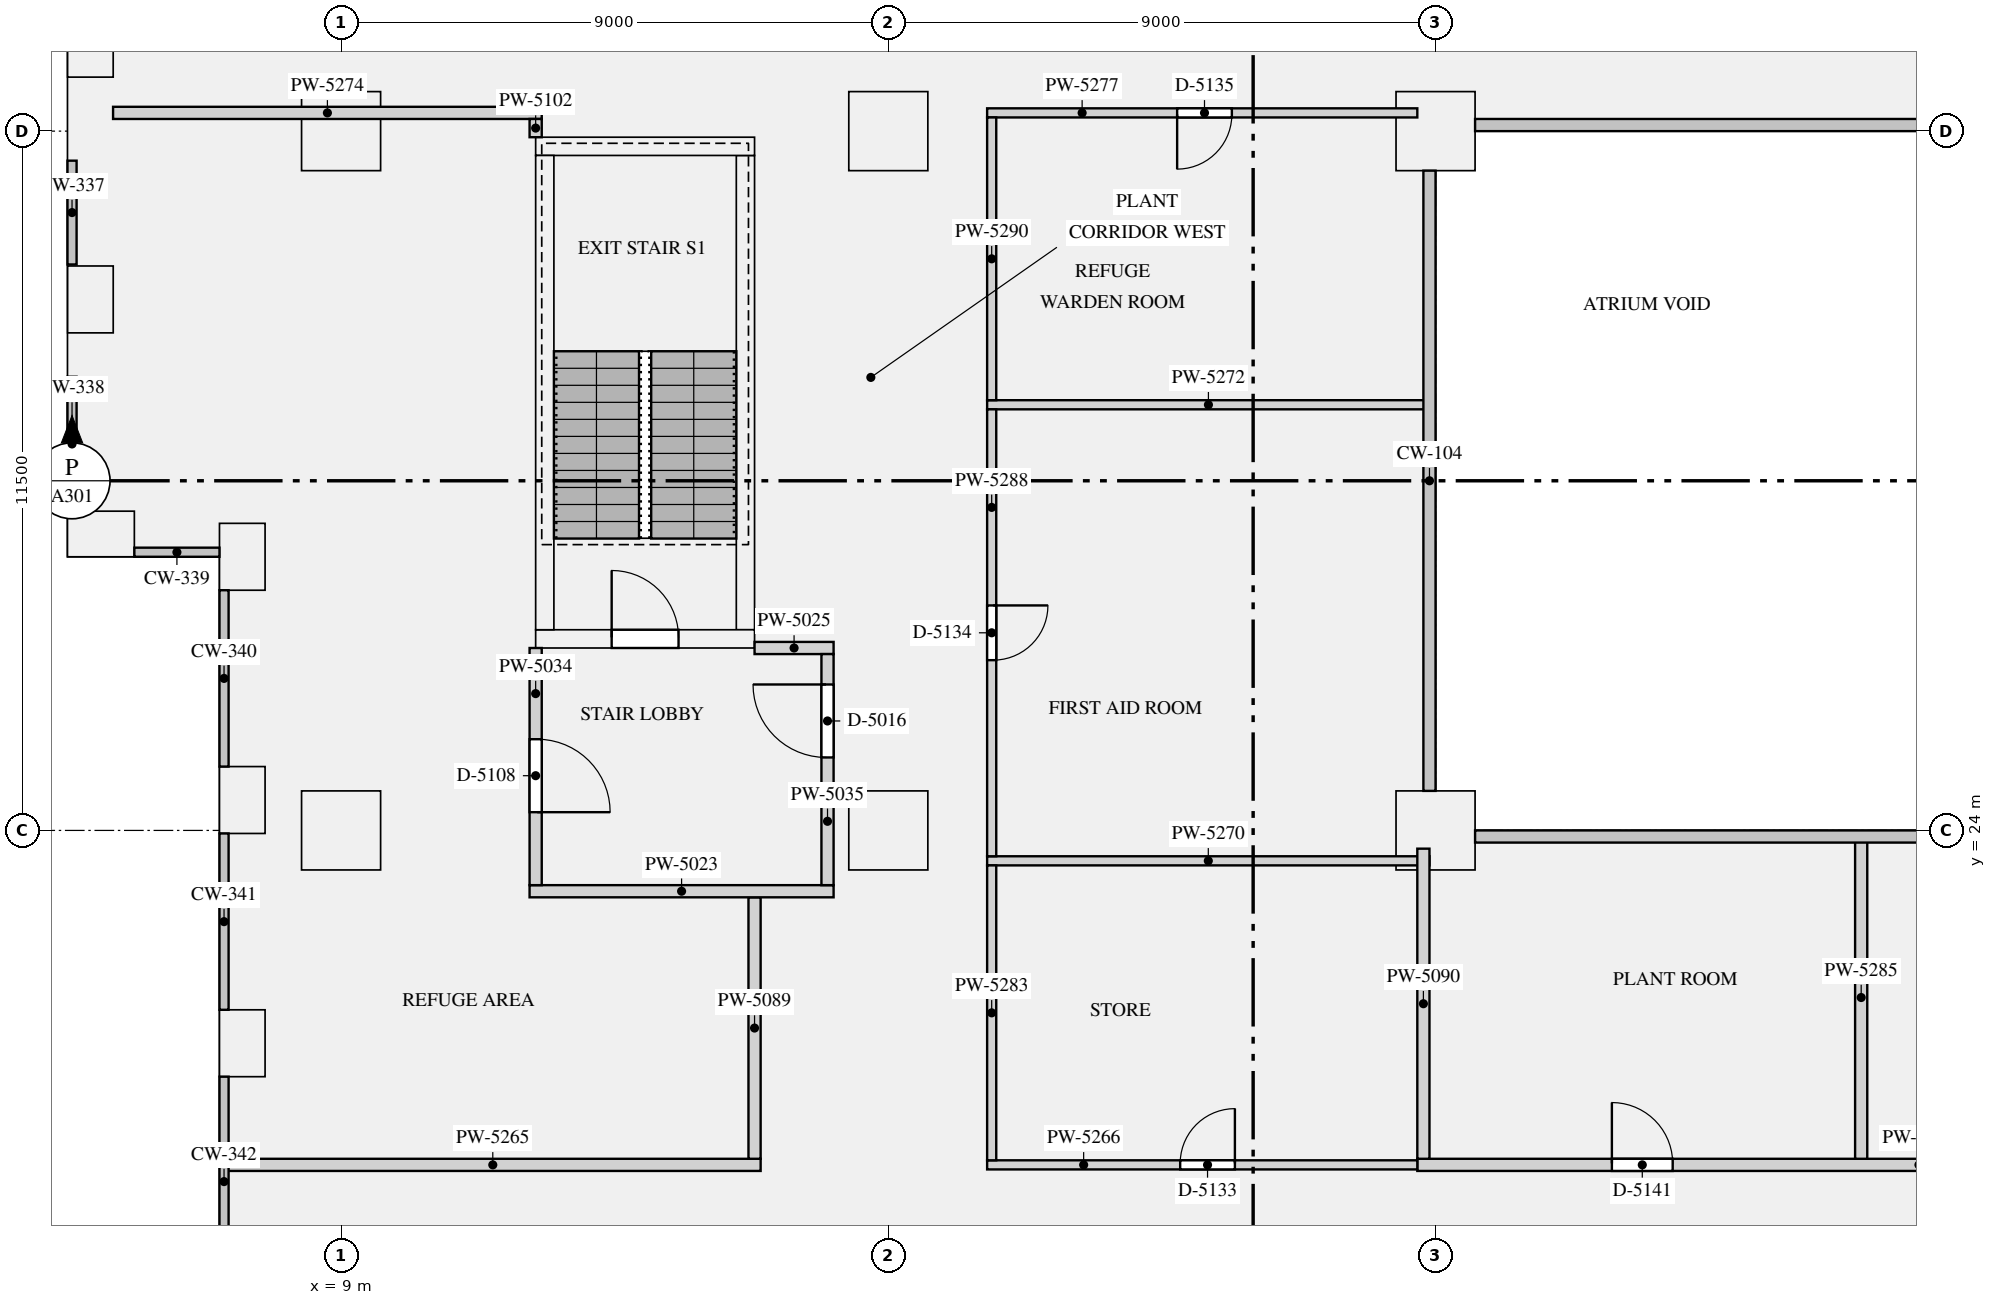
"""IFC4 building model, lengths in metres.
Left out: names, types, materials, properties, quantities, classifications, styles, units other than length and angle.
Written with IfcOpenShell. Run it as: python <this file> out.ifc"""

import sys

from ifc_helpers import new_model, si_unit, direction, frame, frame_2d, origin, origin_2d, place, context, subcontext, project, spatial, rectangle, extrude, element, fill, save


model = new_model("IFC4")
c1 = context("Model", 3, precision=1e-05, world=origin(), true_north=direction((0.0, 1.0)))
c2 = subcontext(c1, "Body", "Model", "MODEL_VIEW")
j1 = project(units=[si_unit("LENGTHUNIT", "METRE"), si_unit("PLANEANGLEUNIT", "RADIAN")], contexts=[c1])
p1 = place(None, origin())
s1 = spatial("IfcSite", under=j1, at=p1, CompositionType="ELEMENT")
p2 = place(p1, origin())
s2 = spatial("IfcBuilding", under=s1, at=p2, CompositionType="ELEMENT")
p3 = place(p2, frame((0.0, 0.0, 137.1)))
s3 = spatial("IfcBuildingStorey", under=s2, at=p3, CompositionType="ELEMENT", Elevation=137.1)
for number, where, z_axis, x_axis in (
    (1, (5.05, 28.875, 0.0), (0.0, 0.0, 1.0), (1.0, 0.0, 0.0)),
    (2, (7.375, 28.5, 0.0), (0.0, 0.0, 1.0), (0.0, -1.0, 0.0)),
    (3, (7.375, 24.5, 0.0), (0.0, 0.0, 1.0), (0.0, -1.0, 0.0)),
    (4, (7.375, 20.5, 0.0), (0.0, 0.0, 1.0), (0.0, -1.0, 0.0)),
):
    element("IfcColumn", number, at=place(p3, frame(where, z_axis=z_axis, x_axis=x_axis)), inside=s3, PredefinedType="USERDEFINED", context=c2, shape_type="SweptSolid", body=[
        extrude(rectangle(XDim=1.1, YDim=0.75, at=origin_2d()), origin(), (0.0, 0.0, 1.0), 4.2),
    ])
p4 = place(p3, frame((4.877, 36.938, -0.332), z_axis=(-0.005653102559, -0.302494318052, 0.953134423876), x_axis=(0.017809346029, 0.952968025262, 0.30254713686)))
e5 = element("IfcColumn", 5, at=p4, inside=s3, PredefinedType="USERDEFINED", context=c2, shape_type="SweptSolid", body=[
    extrude(rectangle(XDim=1.1, YDim=0.75, at=origin_2d()), origin(), (0.0, 0.0, 1.0), 4.578),
])
p5 = place(p3, frame((4.877, 32.732, -0.412), z_axis=(-0.005863351746, -0.156871310817, 0.987601646895), x_axis=(0.03688765774, 0.986912515705, 0.156980849313)))
e6 = element("IfcColumn", 6, at=p5, inside=s3, PredefinedType="USERDEFINED", context=c2, shape_type="SweptSolid", body=[
    extrude(rectangle(XDim=1.1, YDim=0.75, at=origin_2d()), origin(), (0.0, 0.0, 1.0), 4.58),
])
for number, where, z_axis, x_axis in (
    (7, (9.0, 24.0, 0.0), (0.0, 0.0, 1.0), (1.0, 0.0, 0.0)),
    (8, (18.0, 24.0, 0.0), (0.0, 0.0, 1.0), (1.0, 0.0, 0.0)),
    (9, (27.0, 24.0, 0.0), (0.0, 0.0, 1.0), (1.0, 0.0, 0.0)),
    (10, (9.0, 35.5, 0.0), (0.0, 0.0, 1.0), (1.0, 0.0, 0.0)),
    (11, (18.0, 35.5, 0.0), (0.0, 0.0, 1.0), (1.0, 0.0, 0.0)),
    (12, (27.0, 35.5, 0.0), (0.0, 0.0, 1.0), (1.0, 0.0, 0.0)),
):
    element("IfcColumn", number, at=place(p3, frame(where, z_axis=z_axis, x_axis=x_axis)), inside=s3, PredefinedType="COLUMN", context=c2, shape_type="SweptSolid", body=[
        extrude(rectangle(XDim=1.3, YDim=1.3, at=origin_2d()), origin(), (0.0, 0.0, 1.0), 4.2),
    ])
p6 = place(p3, frame((12.2, 27.15, 0.0), z_axis=(0.0, 0.0, 1.0), x_axis=(1.0, 0.0, 0.0)))
e13 = element("IfcWall", 13, at=p6, inside=s3, PredefinedType="SHEAR", context=c2, shape_type="SweptSolid", body=[
    extrude(rectangle(XDim=3.6, YDim=0.3, at=frame_2d((1.8, 0.0))), origin(), (0.0, 0.0, 1.0), 4.2),
])
p7 = place(p6, frame((1.25, 0.0, 0.0)))
e14 = element("IfcOpeningElement", 14, at=p7, cuts=e13, PredefinedType="OPENING", context=c2, shape_type="SweptSolid", body=[
    extrude(rectangle(XDim=1.1, YDim=2.1, at=frame_2d((0.55, 1.05))), frame((0.0, 0.16, 0.0), z_axis=(0.0, -1.0, 0.0), x_axis=(1.0, 0.0, 0.0)), (0.0, 0.0, 1.0), 0.32),
])
p8 = place(p3, frame((12.2, 35.25, 0.0), z_axis=(0.0, 0.0, 1.0), x_axis=(1.0, 0.0, 0.0)))
e15 = element("IfcWall", 15, at=p8, inside=s3, PredefinedType="SHEAR", context=c2, shape_type="SweptSolid", body=[
    extrude(rectangle(XDim=3.6, YDim=0.3, at=frame_2d((1.8, 0.0))), origin(), (0.0, 0.0, 1.0), 4.2),
])
for number, where, z_axis, x_axis in (
    (16, (12.35, 27.3, 0.0), (0.0, 0.0, 1.0), (0.0, 1.0, 0.0)),
    (17, (15.65, 27.3, 0.0), (0.0, 0.0, 1.0), (0.0, 1.0, 0.0)),
):
    element("IfcWall", number, at=place(p3, frame(where, z_axis=z_axis, x_axis=x_axis)), inside=s3, PredefinedType="SHEAR", context=c2, shape_type="SweptSolid", body=[
        extrude(rectangle(XDim=7.8, YDim=0.3, at=frame_2d((3.9, 0.0))), origin(), (0.0, 0.0, 1.0), 4.2),
    ])
p9 = place(p3, frame((12.1, 23.0, 0.0), z_axis=(0.0, 0.0, 1.0), x_axis=(1.0, 0.0, 0.0)))
e18 = element("IfcWall", 18, at=p9, inside=s3, PredefinedType="PARTITIONING", context=c2, shape_type="SweptSolid", body=[
    extrude(rectangle(XDim=5.0, YDim=0.2, at=frame_2d((2.5, 0.0))), origin(), (0.0, 0.0, 1.0), 3.7),
])
p10 = place(p3, frame((15.8, 27.0, 0.0), z_axis=(0.0, 0.0, 1.0), x_axis=(1.0, 0.0, 0.0)))
e19 = element("IfcWall", 19, at=p10, inside=s3, PredefinedType="PARTITIONING", context=c2, shape_type="SweptSolid", body=[
    extrude(rectangle(XDim=1.3, YDim=0.2, at=frame_2d((0.65, 0.0))), origin(), (0.0, 0.0, 1.0), 3.7),
])
p11 = place(p3, frame((12.2, 23.1, 0.0), z_axis=(0.0, 0.0, 1.0), x_axis=(0.0, 1.0, 0.0)))
e20 = element("IfcWall", 20, at=p11, inside=s3, PredefinedType="PARTITIONING", context=c2, shape_type="SweptSolid", body=[
    extrude(rectangle(XDim=3.9, YDim=0.2, at=frame_2d((1.95, 0.0))), origin(), (0.0, 0.0, 1.0), 3.7),
])
p12 = place(p11, frame((1.2, 0.0, 0.0)))
e21 = element("IfcOpeningElement", 21, at=p12, cuts=e20, PredefinedType="OPENING", context=c2, shape_type="SweptSolid", body=[
    extrude(rectangle(XDim=1.2, YDim=2.1, at=frame_2d((0.6, 1.05))), frame((0.0, 0.11, 0.0), z_axis=(0.0, -1.0, 0.0), x_axis=(1.0, 0.0, 0.0)), (0.0, 0.0, 1.0), 0.22),
])
p13 = place(p3, frame((17.0, 23.1, 0.0), z_axis=(0.0, 0.0, 1.0), x_axis=(0.0, 1.0, 0.0)))
e22 = element("IfcWall", 22, at=p13, inside=s3, PredefinedType="PARTITIONING", context=c2, shape_type="SweptSolid", body=[
    extrude(rectangle(XDim=3.8, YDim=0.2, at=frame_2d((1.9, 0.0))), origin(), (0.0, 0.0, 1.0), 3.7),
])
p14 = place(p13, frame((2.1, 0.0, 0.0)))
e23 = element("IfcOpeningElement", 23, at=p14, cuts=e22, PredefinedType="OPENING", context=c2, shape_type="SweptSolid", body=[
    extrude(rectangle(XDim=1.2, YDim=2.1, at=frame_2d((0.6, 1.05))), frame((0.0, 0.11, 0.0), z_axis=(0.0, -1.0, 0.0), x_axis=(1.0, 0.0, 0.0)), (0.0, 0.0, 1.0), 0.22),
])
p15 = place(p3, frame((7.09, 18.5, 0.0), z_axis=(0.0, 0.0, 1.0), x_axis=(1.0, 0.0, 0.0)))
e24 = element("IfcWall", 24, at=p15, inside=s3, PredefinedType="PARTITIONING", context=c2, shape_type="SweptSolid", body=[
    extrude(rectangle(XDim=8.81, YDim=0.2, at=frame_2d((4.405, 0.0))), origin(), (0.0, 0.0, 1.0), 3.7),
])
p16 = place(p3, frame((26.7, 18.5, 0.0), z_axis=(0.0, 0.0, 1.0), x_axis=(1.0, 0.0, 0.0)))
e25 = element("IfcWall", 25, at=p16, inside=s3, PredefinedType="PARTITIONING", context=c2, shape_type="SweptSolid", body=[
    extrude(rectangle(XDim=18.6, YDim=0.2, at=frame_2d((9.3, 0.0))), origin(), (0.0, 0.0, 1.0), 3.7),
])
p17 = place(p16, frame((3.2, 0.0, 0.0)))
e26 = element("IfcOpeningElement", 26, at=p17, cuts=e25, PredefinedType="OPENING", context=c2, shape_type="SweptSolid", body=[
    extrude(rectangle(XDim=1.0, YDim=2.1, at=frame_2d((0.5, 1.05))), frame((0.0, 0.11, 0.0), z_axis=(0.0, -1.0, 0.0), x_axis=(1.0, 0.0, 0.0)), (0.0, 0.0, 1.0), 0.22),
])
p18 = place(p16, frame((12.3, 0.0, 0.0)))
e27 = element("IfcOpeningElement", 27, at=p18, cuts=e25, PredefinedType="OPENING", context=c2, shape_type="SweptSolid", body=[
    extrude(rectangle(XDim=1.2, YDim=2.1, at=frame_2d((0.6, 1.05))), frame((0.0, 0.11, 0.0), z_axis=(0.0, -1.0, 0.0), x_axis=(1.0, 0.0, 0.0)), (0.0, 0.0, 1.0), 0.22),
])
p19 = place(p3, frame((19.625, 18.5, 0.0), z_axis=(0.0, 0.0, 1.0), x_axis=(1.0, 0.0, 0.0)))
e28 = element("IfcWall", 28, at=p19, inside=s3, PredefinedType="PARTITIONING", context=c2, shape_type="SweptSolid", body=[
    extrude(rectangle(XDim=7.075, YDim=0.15, at=frame_2d((3.538, 0.0))), origin(), (0.0, 0.0, 1.0), 3.7),
])
p20 = place(p19, frame((3.175, 0.0, 0.0)))
e29 = element("IfcOpeningElement", 29, at=p20, cuts=e28, PredefinedType="OPENING", context=c2, shape_type="SweptSolid", body=[
    extrude(rectangle(XDim=0.9, YDim=2.1, at=frame_2d((0.45, 1.05))), frame((0.0, 0.085, 0.0), z_axis=(0.0, -1.0, 0.0), x_axis=(1.0, 0.0, 0.0)), (0.0, 0.0, 1.0), 0.17),
])
p21 = place(p3, frame((19.625, 23.5, 0.0), z_axis=(0.0, 0.0, 1.0), x_axis=(1.0, 0.0, 0.0)))
e30 = element("IfcWall", 30, at=p21, inside=s3, PredefinedType="PARTITIONING", context=c2, shape_type="SweptSolid", body=[
    extrude(rectangle(XDim=7.275, YDim=0.15, at=frame_2d((3.637, 0.0))), origin(), (0.0, 0.0, 1.0), 3.7),
])
p22 = place(p3, frame((19.625, 31.0, 0.0), z_axis=(0.0, 0.0, 1.0), x_axis=(1.0, 0.0, 0.0)))
e31 = element("IfcWall", 31, at=p22, inside=s3, PredefinedType="PARTITIONING", context=c2, shape_type="SweptSolid", body=[
    extrude(rectangle(XDim=7.279, YDim=0.15, at=frame_2d((3.64, 0.0))), origin(), (0.0, 0.0, 1.0), 3.7),
])
p23 = place(p3, frame((5.25, 35.8, 0.0), z_axis=(0.0, 0.0, 1.0), x_axis=(1.0, 0.0, 0.0)))
e32 = element("IfcWall", 32, at=p23, inside=s3, PredefinedType="PARTITIONING", context=c2, shape_type="SweptSolid", body=[
    extrude(rectangle(XDim=7.05, YDim=0.2, at=frame_2d((3.525, 0.0))), origin(), (0.0, 0.0, 1.0), 3.7),
])
p24 = place(p3, frame((19.625, 35.8, 0.0), z_axis=(0.0, 0.0, 1.0), x_axis=(1.0, 0.0, 0.0)))
e33 = element("IfcWall", 33, at=p24, inside=s3, PredefinedType="PARTITIONING", context=c2, shape_type="SweptSolid", body=[
    extrude(rectangle(XDim=7.075, YDim=0.15, at=frame_2d((3.538, 0.0))), origin(), (0.0, 0.0, 1.0), 3.7),
])
p25 = place(p24, frame((3.125, 0.0, 0.0)))
e34 = element("IfcOpeningElement", 34, at=p25, cuts=e33, PredefinedType="OPENING", context=c2, shape_type="SweptSolid", body=[
    extrude(rectangle(XDim=0.9, YDim=2.1, at=frame_2d((0.45, 1.05))), frame((0.0, 0.085, 0.0), z_axis=(0.0, -1.0, 0.0), x_axis=(1.0, 0.0, 0.0)), (0.0, 0.0, 1.0), 0.17),
])
p26 = place(p3, frame((19.7, 18.575, 0.0), z_axis=(0.0, 0.0, 1.0), x_axis=(0.0, 1.0, 0.0)))
e35 = element("IfcWall", 35, at=p26, inside=s3, PredefinedType="PARTITIONING", context=c2, shape_type="SweptSolid", body=[
    extrude(rectangle(XDim=4.85, YDim=0.15, at=frame_2d((2.425, 0.0))), origin(), (0.0, 0.0, 1.0), 3.7),
])
p27 = place(p3, frame((15.8, 18.6, 0.0), z_axis=(0.0, 0.0, 1.0), x_axis=(0.0, 1.0, 0.0)))
e36 = element("IfcWall", 36, at=p27, inside=s3, PredefinedType="PARTITIONING", context=c2, shape_type="SweptSolid", body=[
    extrude(rectangle(XDim=4.3, YDim=0.2, at=frame_2d((2.15, 0.0))), origin(), (0.0, 0.0, 1.0), 3.7),
])
p28 = place(p3, frame((26.8, 18.6, 0.0), z_axis=(0.0, 0.0, 1.0), x_axis=(0.0, 1.0, 0.0)))
e37 = element("IfcWall", 37, at=p28, inside=s3, PredefinedType="PARTITIONING", context=c2, shape_type="SweptSolid", body=[
    extrude(rectangle(XDim=5.1, YDim=0.2, at=frame_2d((2.55, 0.0))), origin(), (0.0, 0.0, 1.0), 3.7),
])
p29 = place(p3, frame((34.0, 18.6, 0.0), z_axis=(0.0, 0.0, 1.0), x_axis=(0.0, 1.0, 0.0)))
e38 = element("IfcWall", 38, at=p29, inside=s3, PredefinedType="PARTITIONING", context=c2, shape_type="SweptSolid", body=[
    extrude(rectangle(XDim=5.304, YDim=0.2, at=frame_2d((2.652, 0.0))), origin(), (0.0, 0.0, 1.0), 3.7),
])
p30 = place(p3, frame((19.7, 23.575, 0.0), z_axis=(0.0, 0.0, 1.0), x_axis=(0.0, 1.0, 0.0)))
e39 = element("IfcWall", 39, at=p30, inside=s3, PredefinedType="PARTITIONING", context=c2, shape_type="SweptSolid", body=[
    extrude(rectangle(XDim=7.35, YDim=0.15, at=frame_2d((3.675, 0.0))), origin(), (0.0, 0.0, 1.0), 3.7),
])
p31 = place(p30, frame((3.225, 0.0, 0.0)))
e40 = element("IfcOpeningElement", 40, at=p31, cuts=e39, PredefinedType="OPENING", context=c2, shape_type="SweptSolid", body=[
    extrude(rectangle(XDim=0.9, YDim=2.1, at=frame_2d((0.45, 1.05))), frame((0.0, 0.085, 0.0), z_axis=(0.0, -1.0, 0.0), x_axis=(1.0, 0.0, 0.0)), (0.0, 0.0, 1.0), 0.17),
])
p32 = place(p3, frame((19.7, 31.075, 0.0), z_axis=(0.0, 0.0, 1.0), x_axis=(0.0, 1.0, 0.0)))
e41 = element("IfcWall", 41, at=p32, inside=s3, PredefinedType="PARTITIONING", context=c2, shape_type="SweptSolid", body=[
    extrude(rectangle(XDim=4.65, YDim=0.15, at=frame_2d((2.325, 0.0))), origin(), (0.0, 0.0, 1.0), 3.7),
])
p33 = place(p3, frame((12.2, 35.4, 0.0), z_axis=(0.0, 0.0, 1.0), x_axis=(0.0, 1.0, 0.0)))
e42 = element("IfcWall", 42, at=p33, inside=s3, PredefinedType="PARTITIONING", context=c2, shape_type="SweptSolid", body=[
    extrude(rectangle(XDim=0.3, YDim=0.2, at=frame_2d((0.15, 0.0))), origin(), (0.0, 0.0, 1.0), 3.7),
])
p34 = place(p7, origin())
e43 = element("IfcDoor", 43, at=p34, inside=s3, OperationType="SINGLE_SWING_LEFT", PredefinedType="DOOR", context=c2, shape_type="SweptSolid", body=[
    extrude(rectangle(XDim=1.1, YDim=2.1, at=frame_2d((0.55, 1.05))), frame((0.0, 0.025, 0.0), z_axis=(0.0, -1.0, 0.0), x_axis=(1.0, 0.0, 0.0)), (0.0, 0.0, 1.0), 0.05),
])
fill(e14, e43)
p35 = place(p14, origin())
e44 = element("IfcDoor", 44, at=p35, inside=s3, OperationType="SINGLE_SWING_RIGHT", PredefinedType="DOOR", context=c2, shape_type="SweptSolid", body=[
    extrude(rectangle(XDim=1.2, YDim=2.1, at=frame_2d((0.6, 1.05))), frame((0.0, 0.025, 0.0), z_axis=(0.0, -1.0, 0.0), x_axis=(1.0, 0.0, 0.0)), (0.0, 0.0, 1.0), 0.05),
])
fill(e23, e44)
p36 = place(p20, origin())
e45 = element("IfcDoor", 45, at=p36, inside=s3, OperationType="SINGLE_SWING_RIGHT", PredefinedType="DOOR", context=c2, shape_type="SweptSolid", body=[
    extrude(rectangle(XDim=0.9, YDim=2.1, at=frame_2d((0.45, 1.05))), frame((0.0, 0.025, 0.0), z_axis=(0.0, -1.0, 0.0), x_axis=(1.0, 0.0, 0.0)), (0.0, 0.0, 1.0), 0.05),
])
fill(e29, e45)
p37 = place(p31, frame((0.9, 0.0, 0.0), z_axis=(0.0, 0.0, 1.0), x_axis=(-1.0, 0.0, 0.0)))
e46 = element("IfcDoor", 46, at=p37, inside=s3, OperationType="SINGLE_SWING_LEFT", PredefinedType="DOOR", context=c2, shape_type="SweptSolid", body=[
    extrude(rectangle(XDim=0.9, YDim=2.1, at=frame_2d((0.45, 1.05))), frame((0.0, 0.025, 0.0), z_axis=(0.0, -1.0, 0.0), x_axis=(1.0, 0.0, 0.0)), (0.0, 0.0, 1.0), 0.05),
])
fill(e40, e46)
p38 = place(p25, frame((0.9, 0.0, 0.0), z_axis=(0.0, 0.0, 1.0), x_axis=(-1.0, 0.0, 0.0)))
e47 = element("IfcDoor", 47, at=p38, inside=s3, OperationType="SINGLE_SWING_RIGHT", PredefinedType="DOOR", context=c2, shape_type="SweptSolid", body=[
    extrude(rectangle(XDim=0.9, YDim=2.1, at=frame_2d((0.45, 1.05))), frame((0.0, 0.025, 0.0), z_axis=(0.0, -1.0, 0.0), x_axis=(1.0, 0.0, 0.0)), (0.0, 0.0, 1.0), 0.05),
])
fill(e34, e47)
p39 = place(p17, origin())
e48 = element("IfcDoor", 48, at=p39, inside=s3, OperationType="SINGLE_SWING_LEFT", PredefinedType="DOOR", context=c2, shape_type="SweptSolid", body=[
    extrude(rectangle(XDim=1.0, YDim=2.1, at=frame_2d((0.5, 1.05))), frame((0.0, 0.025, 0.0), z_axis=(0.0, -1.0, 0.0), x_axis=(1.0, 0.0, 0.0)), (0.0, 0.0, 1.0), 0.05),
])
fill(e26, e48)
p40 = place(p12, frame((1.2, 0.0, 0.0), z_axis=(0.0, 0.0, 1.0), x_axis=(-1.0, 0.0, 0.0)))
e49 = element("IfcDoor", 49, at=p40, inside=s3, OperationType="SINGLE_SWING_RIGHT", PredefinedType="DOOR", context=c2, shape_type="SweptSolid", body=[
    extrude(rectangle(XDim=1.2, YDim=2.1, at=frame_2d((0.6, 1.05))), frame((0.0, 0.025, 0.0), z_axis=(0.0, -1.0, 0.0), x_axis=(1.0, 0.0, 0.0)), (0.0, 0.0, 1.0), 0.05),
])
fill(e21, e49)
save(model, sys.argv[1])
